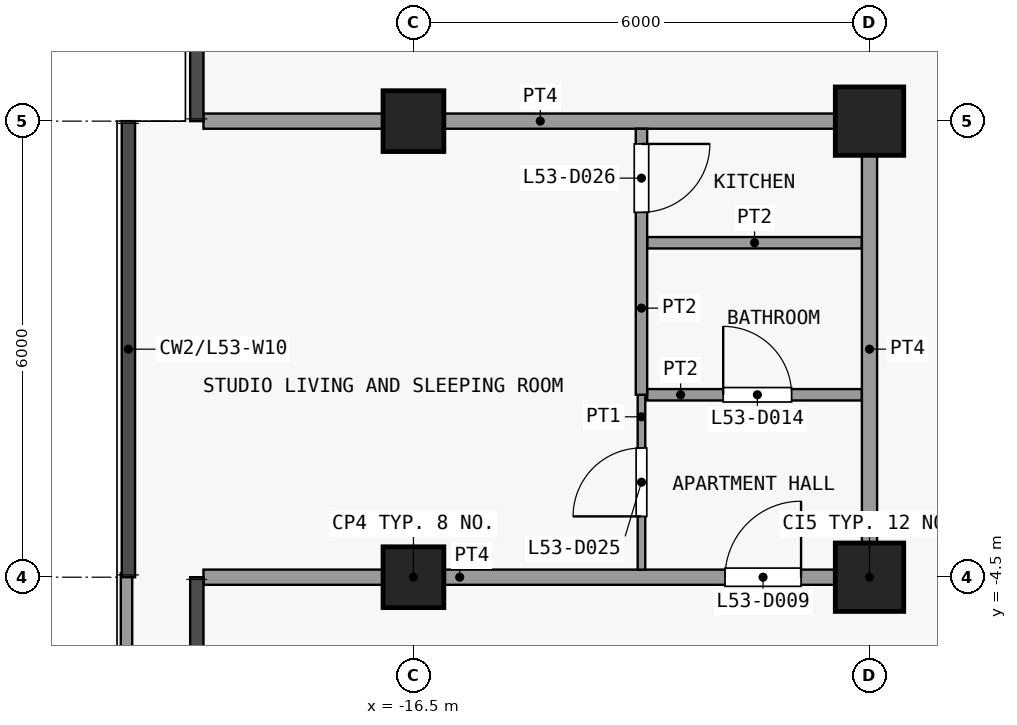
"""IFC4 building model, lengths in metres.
Left out: names, types, materials, properties, quantities, classifications, styles, units other than length and angle.
Written with IfcOpenShell. Run it as: python <this file> out.ifc"""

import sys

from ifc_helpers import new_model, si_unit, direction, frame, frame_2d, origin, origin_2d, place, context, subcontext, project, spatial, rectangle, extrude, element, fill, save


model = new_model("IFC4")
c1 = context("Model", 3, precision=1e-05, world=origin(), true_north=direction((0.0, 1.0)))
c2 = subcontext(c1, "Body", "Model", "MODEL_VIEW")
j1 = project(units=[si_unit("LENGTHUNIT", "METRE"), si_unit("PLANEANGLEUNIT", "RADIAN")], contexts=[c1])
p1 = place(None, origin())
s1 = spatial("IfcSite", under=j1, at=p1, CompositionType="ELEMENT")
p2 = place(p1, origin())
s2 = spatial("IfcBuilding", under=s1, at=p2, CompositionType="ELEMENT")
p3 = place(p2, frame((0.0, 0.0, 212.3)))
s3 = spatial("IfcBuildingStorey", under=s2, at=p3, CompositionType="ELEMENT", Elevation=212.3)
for number, where, z_axis, x_axis in (
    (1, (-16.5, -4.5, 0.0), (0.0, 0.0, 1.0), (1.0, 0.0, 0.0)),
    (2, (-16.5, 1.5, 0.0), (0.0, 0.0, 1.0), (1.0, 0.0, 0.0)),
):
    element("IfcColumn", number, at=place(p3, frame(where, z_axis=z_axis, x_axis=x_axis)), inside=s3, PredefinedType="COLUMN", context=c2, shape_type="SweptSolid", body=[
        extrude(rectangle(XDim=0.8, YDim=0.8, at=origin_2d()), origin(), (0.0, 0.0, 1.0), 3.6),
    ])
for number, where, z_axis, x_axis in (
    (3, (-10.5, -4.5, 0.0), (0.0, 0.0, 1.0), (1.0, 0.0, 0.0)),
    (4, (-10.5, 1.5, 0.0), (0.0, 0.0, 1.0), (1.0, 0.0, 0.0)),
):
    element("IfcColumn", number, at=place(p3, frame(where, z_axis=z_axis, x_axis=x_axis)), inside=s3, PredefinedType="COLUMN", context=c2, shape_type="SweptSolid", body=[
        extrude(rectangle(XDim=0.9, YDim=0.9, at=origin_2d()), origin(), (0.0, 0.0, 1.0), 3.6),
    ])
p4 = place(p3, frame((-20.275, -13.3, 0.0), z_axis=(0.0, 0.0, 1.0), x_axis=(0.0, 1.0, 0.0)))
e5 = element("IfcWall", 5, at=p4, inside=s3, PredefinedType="PARAPET", context=c2, shape_type="SweptSolid", body=[
    extrude(rectangle(XDim=8.853, YDim=0.15, at=frame_2d((4.426, 0.0))), origin(), (0.0, 0.0, 1.0), 1.15),
])
p5 = place(p3, frame((-19.262, -4.5, 0.0), z_axis=(0.0, 0.0, 1.0), x_axis=(1.0, 0.0, 0.0)))
e6 = element("IfcWall", 6, at=p5, inside=s3, PredefinedType="PARTITIONING", context=c2, shape_type="SweptSolid", body=[
    extrude(rectangle(XDim=8.863, YDim=0.2, at=frame_2d((4.431, 0.0))), origin(), (0.0, 0.0, 1.0), 3.3),
])
p6 = place(p5, frame((6.862, 0.0, 0.0)))
e7 = element("IfcOpeningElement", 7, at=p6, cuts=e6, PredefinedType="OPENING", context=c2, shape_type="SweptSolid", body=[
    extrude(rectangle(XDim=1.0, YDim=2.1, at=frame_2d((0.5, 1.05))), frame((0.0, 0.11, 0.0), z_axis=(0.0, -1.0, 0.0), x_axis=(1.0, 0.0, 0.0)), (0.0, 0.0, 1.0), 0.22),
])
p7 = place(p3, frame((-13.425, -2.1, 0.0), z_axis=(0.0, 0.0, 1.0), x_axis=(1.0, 0.0, 0.0)))
e8 = element("IfcWall", 8, at=p7, inside=s3, PredefinedType="PARTITIONING", context=c2, shape_type="SweptSolid", body=[
    extrude(rectangle(XDim=2.825, YDim=0.15, at=frame_2d((1.413, 0.0))), origin(), (0.0, 0.0, 1.0), 3.3),
])
p8 = place(p7, frame((1.0, 0.0, 0.0)))
e9 = element("IfcOpeningElement", 9, at=p8, cuts=e8, PredefinedType="OPENING", context=c2, shape_type="SweptSolid", body=[
    extrude(rectangle(XDim=0.9, YDim=2.1, at=frame_2d((0.45, 1.05))), frame((0.0, 0.085, 0.0), z_axis=(0.0, -1.0, 0.0), x_axis=(1.0, 0.0, 0.0)), (0.0, 0.0, 1.0), 0.17),
])
p9 = place(p3, frame((-13.425, -0.1, 0.0), z_axis=(0.0, 0.0, 1.0), x_axis=(1.0, 0.0, 0.0)))
e10 = element("IfcWall", 10, at=p9, inside=s3, PredefinedType="PARTITIONING", context=c2, shape_type="SweptSolid", body=[
    extrude(rectangle(XDim=2.825, YDim=0.15, at=frame_2d((1.413, 0.0))), origin(), (0.0, 0.0, 1.0), 3.3),
])
p10 = place(p3, frame((-19.262, 1.5, 0.0), z_axis=(0.0, 0.0, 1.0), x_axis=(1.0, 0.0, 0.0)))
e11 = element("IfcWall", 11, at=p10, inside=s3, PredefinedType="PARTITIONING", context=c2, shape_type="SweptSolid", body=[
    extrude(rectangle(XDim=8.863, YDim=0.2, at=frame_2d((4.431, 0.0))), origin(), (0.0, 0.0, 1.0), 3.3),
])
p11 = place(p3, frame((-13.5, -4.4, 0.0), z_axis=(0.0, 0.0, 1.0), x_axis=(0.0, 1.0, 0.0)))
e12 = element("IfcWall", 12, at=p11, inside=s3, PredefinedType="PARTITIONING", context=c2, shape_type="SweptSolid", body=[
    extrude(rectangle(XDim=2.3, YDim=0.1, at=frame_2d((1.15, 0.0))), origin(), (0.0, 0.0, 1.0), 3.3),
])
p12 = place(p11, frame((0.7, 0.0, 0.0)))
e13 = element("IfcOpeningElement", 13, at=p12, cuts=e12, PredefinedType="OPENING", context=c2, shape_type="SweptSolid", body=[
    extrude(rectangle(XDim=0.9, YDim=2.1, at=frame_2d((0.45, 1.05))), frame((0.0, 0.06, 0.0), z_axis=(0.0, -1.0, 0.0), x_axis=(1.0, 0.0, 0.0)), (0.0, 0.0, 1.0), 0.12),
])
p13 = place(p3, frame((-13.5, -2.1, 0.0), z_axis=(0.0, 0.0, 1.0), x_axis=(0.0, 1.0, 0.0)))
e14 = element("IfcWall", 14, at=p13, inside=s3, PredefinedType="PARTITIONING", context=c2, shape_type="SweptSolid", body=[
    extrude(rectangle(XDim=3.5, YDim=0.15, at=frame_2d((1.75, 0.0))), origin(), (0.0, 0.0, 1.0), 3.3),
])
p14 = place(p13, frame((2.4, 0.0, 0.0)))
e15 = element("IfcOpeningElement", 15, at=p14, cuts=e14, PredefinedType="OPENING", context=c2, shape_type="SweptSolid", body=[
    extrude(rectangle(XDim=0.9, YDim=2.1, at=frame_2d((0.45, 1.05))), frame((0.0, 0.085, 0.0), z_axis=(0.0, -1.0, 0.0), x_axis=(1.0, 0.0, 0.0)), (0.0, 0.0, 1.0), 0.17),
])
p15 = place(p3, frame((-10.5, -4.4, 0.0), z_axis=(0.0, 0.0, 1.0), x_axis=(0.0, 1.0, 0.0)))
e16 = element("IfcWall", 16, at=p15, inside=s3, PredefinedType="PARTITIONING", context=c2, shape_type="SweptSolid", body=[
    extrude(rectangle(XDim=5.8, YDim=0.2, at=frame_2d((2.9, 0.0))), origin(), (0.0, 0.0, 1.0), 3.3),
])
p16 = place(p6, origin())
e17 = element("IfcDoor", 17, at=p16, inside=s3, OperationType="SINGLE_SWING_LEFT", PredefinedType="DOOR", context=c2, shape_type="SweptSolid", body=[
    extrude(rectangle(XDim=1.0, YDim=2.1, at=frame_2d((0.5, 1.05))), frame((0.0, 0.025, 0.0), z_axis=(0.0, -1.0, 0.0), x_axis=(1.0, 0.0, 0.0)), (0.0, 0.0, 1.0), 0.05),
])
fill(e7, e17)
p17 = place(p8, origin())
e18 = element("IfcDoor", 18, at=p17, inside=s3, OperationType="SINGLE_SWING_RIGHT", PredefinedType="DOOR", context=c2, shape_type="SweptSolid", body=[
    extrude(rectangle(XDim=0.9, YDim=2.1, at=frame_2d((0.45, 1.05))), frame((0.0, 0.025, 0.0), z_axis=(0.0, -1.0, 0.0), x_axis=(1.0, 0.0, 0.0)), (0.0, 0.0, 1.0), 0.05),
])
fill(e9, e18)
p18 = place(p12, origin())
e19 = element("IfcDoor", 19, at=p18, inside=s3, OperationType="SINGLE_SWING_RIGHT", PredefinedType="DOOR", context=c2, shape_type="SweptSolid", body=[
    extrude(rectangle(XDim=0.9, YDim=2.1, at=frame_2d((0.45, 1.05))), frame((0.0, 0.025, 0.0), z_axis=(0.0, -1.0, 0.0), x_axis=(1.0, 0.0, 0.0)), (0.0, 0.0, 1.0), 0.05),
])
fill(e13, e19)
p19 = place(p14, origin())
e20 = element("IfcDoor", 20, at=p19, inside=s3, OperationType="SINGLE_SWING_RIGHT", PredefinedType="DOOR", context=c2, shape_type="SweptSolid", body=[
    extrude(rectangle(XDim=0.9, YDim=2.1, at=frame_2d((0.45, 1.05))), frame((0.0, 0.025, 0.0), z_axis=(0.0, -1.0, 0.0), x_axis=(1.0, 0.0, 0.0)), (0.0, 0.0, 1.0), 0.05),
])
fill(e15, e20)
save(model, sys.argv[1])
